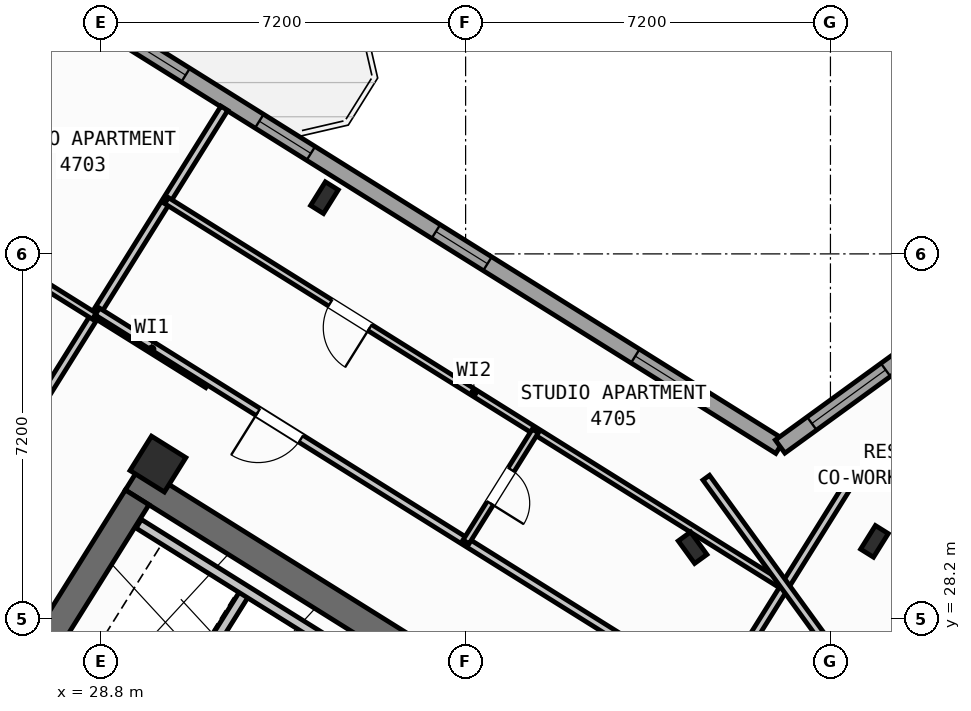
"""IFC4 building model, lengths in metres.
Left out: names, types, materials, properties, quantities, classifications, styles, units other than length and angle.
Written with IfcOpenShell. Run it as: python <this file> out.ifc"""

import sys

from ifc_helpers import new_model, si_unit, direction, frame, frame_2d, origin, origin_2d, place, context, subcontext, project, spatial, rectangle, hollow_rectangle, i_section, extrude, source, transform, mapped, element, fill, save


model = new_model("IFC4")
c1 = context("Model", 3, precision=1e-05, world=origin(), true_north=direction((0.0, 1.0)))
c2 = subcontext(c1, "Body", "Model", "MODEL_VIEW")
j1 = project(units=[si_unit("LENGTHUNIT", "METRE"), si_unit("PLANEANGLEUNIT", "RADIAN")], contexts=[c1])
p1 = place(None, origin())
s1 = spatial("IfcSite", under=j1, at=p1, CompositionType="ELEMENT")
p2 = place(p1, origin())
s2 = spatial("IfcBuilding", under=s1, at=p2, CompositionType="ELEMENT")
p3 = place(p2, frame((0.0, 0.0, 187.8)))
s3 = spatial("IfcBuildingStorey", under=s2, at=p3, CompositionType="ELEMENT", Elevation=187.8)
p4 = place(p3, frame((40.573, 24.01, 0.0), z_axis=(0.0, 0.0, 1.0), x_axis=(-0.848047359947, 0.529920442413, 0.0)))
e1 = element("IfcWall", 1, at=p4, inside=s3, PredefinedType="SHEAR", context=c2, shape_type="SweptSolid", body=[
    extrude(rectangle(XDim=13.14, YDim=0.55, at=frame_2d((6.57, 0.0))), origin(), (0.0, 0.0, 1.0), 3.35),
])
p5 = place(p3, frame((29.517, 30.594, 0.0), z_axis=(0.0, 0.0, 1.0), x_axis=(-0.529906864564, -0.848055844204, 0.0)))
e2 = element("IfcWall", 2, at=p5, inside=s3, PredefinedType="SHEAR", context=c2, shape_type="SweptSolid", body=[
    extrude(rectangle(XDim=3.575, YDim=0.55, at=frame_2d((1.788, 0.0))), origin(), (0.0, 0.0, 1.0), 3.35),
])
p6 = place(p3, frame((44.365, 24.142, 0.0), z_axis=(0.0, 0.0, 1.0), x_axis=(0.809024304885, 0.587775190107, 0.0)))
e3 = element("IfcWall", 3, at=p6, inside=s3, PredefinedType="SHEAR", context=c2, shape_type="SweptSolid", body=[
    extrude(rectangle(XDim=12.34, YDim=0.55, at=frame_2d((6.17, 0.0))), origin(), (0.0, 0.0, 1.0), 3.35),
])
m1 = source(origin(), c2, "Body", "SweptSolid", [
    extrude(i_section(OverallWidth=0.3, OverallDepth=0.55, WebThickness=0.015, FlangeThickness=0.029, at=origin_2d()), origin(), (0.0, 0.0, 1.0), 3.6),
])
for number, where, z_axis, x_axis in (
    (4, (44.068, 29.726, 0.0), (0.0, 0.0, 1.0), (-0.848, 0.53, 0.0)),
    (5, (33.213, 36.509, 0.0), (0.0, 0.0, 1.0), (-0.848, 0.53, 0.0)),
):
    element("IfcColumn", number, at=place(p3, frame(where, z_axis=z_axis, x_axis=x_axis)), inside=s3, PredefinedType="COLUMN", context=c2, shape_type="MappedRepresentation", body=[
        mapped(m1, transform((0.0, 0.0, 0.0), scale=1.0)),
    ])
m2 = source(origin(), c2, "Body", "SweptSolid", [
    extrude(hollow_rectangle(XDim=0.8, YDim=0.8, WallThickness=0.032, at=origin_2d()), origin(), (0.0, 0.0, 1.0), 3.6),
])
p7 = place(p3, frame((29.928, 31.251, 0.0), z_axis=(0.0, 0.0, 1.0), x_axis=(-0.848048096156, 0.529919264233, 0.0)))
e6 = element("IfcColumn", 6, at=p7, inside=s3, PredefinedType="COLUMN", context=c2, shape_type="MappedRepresentation", body=[
    mapped(m2, transform((0.0, 0.0, 0.0), scale=1.0)),
])
p8 = place(p3, frame((40.479, 29.601, 0.0), z_axis=(0.0, 0.0, 1.0), x_axis=(0.809016994375, 0.587785252292, 0.0)))
e7 = element("IfcColumn", 7, at=p8, inside=s3, PredefinedType="COLUMN", context=c2, shape_type="MappedRepresentation", body=[
    mapped(m1, transform((0.0, 0.0, 0.0), scale=1.0)),
])
p9 = place(p3, frame((31.76, 12.183, 0.0), z_axis=(0.0, 0.0, 1.0), x_axis=(-0.848047074256, 0.529920899612, 0.0)))
e8 = element("IfcWall", 8, at=p9, inside=s3, PredefinedType="STANDARD", context=c2, shape_type="SweptSolid", body=[
    extrude(rectangle(XDim=30.652, YDim=0.32, at=frame_2d((15.326, 0.0))), origin(), (0.0, 0.0, 1.0), 3.35),
])
p10 = place(p9, frame((15.166, 0.0, 0.0)))
e9 = element("IfcOpeningElement", 9, at=p10, cuts=e8, PredefinedType="OPENING", context=c2, shape_type="SweptSolid", body=[
    extrude(rectangle(XDim=1.2, YDim=2.15, at=frame_2d((0.6, 1.075))), frame((0.0, 0.17, 0.0), z_axis=(0.0, -1.0, 0.0), x_axis=(1.0, 0.0, 0.0)), (0.0, 0.0, 1.0), 0.34),
])
p11 = place(p9, frame((2.015, 0.0, 0.8)))
e10 = element("IfcOpeningElement", 10, at=p11, cuts=e8, PredefinedType="OPENING", context=c2, shape_type="SweptSolid", body=[
    extrude(rectangle(XDim=2.1, YDim=1.55, at=frame_2d((1.05, 0.775))), frame((0.0, 0.17, 0.0), z_axis=(0.0, -1.0, 0.0), x_axis=(1.0, 0.0, 0.0)), (0.0, 0.0, 1.0), 0.34),
])
p12 = place(p9, frame((7.244, 0.0, 0.8)))
e11 = element("IfcOpeningElement", 11, at=p12, cuts=e8, PredefinedType="OPENING", context=c2, shape_type="SweptSolid", body=[
    extrude(rectangle(XDim=2.1, YDim=1.55, at=frame_2d((1.05, 0.775))), frame((0.0, 0.17, 0.0), z_axis=(0.0, -1.0, 0.0), x_axis=(1.0, 0.0, 0.0)), (0.0, 0.0, 1.0), 0.34),
])
p13 = place(p9, frame((12.623, 0.0, 1.0)))
e12 = element("IfcOpeningElement", 12, at=p13, cuts=e8, PredefinedType="OPENING", context=c2, shape_type="SweptSolid", body=[
    extrude(rectangle(XDim=0.9, YDim=1.25, at=frame_2d((0.45, 0.625))), frame((0.0, 0.17, 0.0), z_axis=(0.0, -1.0, 0.0), x_axis=(1.0, 0.0, 0.0)), (0.0, 0.0, 1.0), 0.34),
])
p14 = place(p9, frame((19.565, 0.0, 0.95)))
e13 = element("IfcOpeningElement", 13, at=p14, cuts=e8, PredefinedType="OPENING", context=c2, shape_type="SweptSolid", body=[
    extrude(rectangle(XDim=1.2, YDim=1.4, at=frame_2d((0.6, 0.7))), frame((0.0, 0.17, 0.0), z_axis=(0.0, -1.0, 0.0), x_axis=(1.0, 0.0, 0.0)), (0.0, 0.0, 1.0), 0.34),
])
p15 = place(p9, frame((25.983, 0.0, 1.0)))
e14 = element("IfcOpeningElement", 14, at=p15, cuts=e8, PredefinedType="OPENING", context=c2, shape_type="SweptSolid", body=[
    extrude(rectangle(XDim=0.9, YDim=1.25, at=frame_2d((0.45, 0.625))), frame((0.0, 0.17, 0.0), z_axis=(0.0, -1.0, 0.0), x_axis=(1.0, 0.0, 0.0)), (0.0, 0.0, 1.0), 0.34),
])
p16 = place(p9, frame((28.433, 0.0, 1.0)))
e15 = element("IfcOpeningElement", 15, at=p16, cuts=e8, PredefinedType="OPENING", context=c2, shape_type="SweptSolid", body=[
    extrude(rectangle(XDim=0.9, YDim=1.25, at=frame_2d((0.45, 0.625))), frame((0.0, 0.17, 0.0), z_axis=(0.0, -1.0, 0.0), x_axis=(1.0, 0.0, 0.0)), (0.0, 0.0, 1.0), 0.34),
])
p17 = place(p3, frame((17.424, 47.083, 0.0), z_axis=(0.0, 0.0, 1.0), x_axis=(0.848049927979, -0.529916332693, 0.0)))
e16 = element("IfcWall", 16, at=p17, inside=s3, PredefinedType="STANDARD", context=c2, shape_type="SweptSolid", body=[
    extrude(rectangle(XDim=29.223, YDim=0.32, at=frame_2d((14.612, 0.0))), origin(), (0.0, 0.0, 1.0), 3.35),
])
p18 = place(p17, frame((3.764, 0.0, 0.0)))
e17 = element("IfcOpeningElement", 17, at=p18, cuts=e16, PredefinedType="OPENING", context=c2, shape_type="SweptSolid", body=[
    extrude(rectangle(XDim=1.05, YDim=2.15, at=frame_2d((0.525, 1.075))), frame((0.0, 0.17, 0.0), z_axis=(0.0, -1.0, 0.0), x_axis=(1.0, 0.0, 0.0)), (0.0, 0.0, 1.0), 0.34),
])
p19 = place(p17, frame((8.344, 0.0, 0.8)))
e18 = element("IfcOpeningElement", 18, at=p19, cuts=e16, PredefinedType="OPENING", context=c2, shape_type="SweptSolid", body=[
    extrude(rectangle(XDim=2.1, YDim=1.55, at=frame_2d((1.05, 0.775))), frame((0.0, 0.17, 0.0), z_axis=(0.0, -1.0, 0.0), x_axis=(1.0, 0.0, 0.0)), (0.0, 0.0, 1.0), 0.34),
])
p20 = place(p17, frame((13.589, 0.0, 0.85)))
e19 = element("IfcOpeningElement", 19, at=p20, cuts=e16, PredefinedType="OPENING", context=c2, shape_type="SweptSolid", body=[
    extrude(rectangle(XDim=1.8, YDim=1.5, at=frame_2d((0.9, 0.75))), frame((0.0, 0.17, 0.0), z_axis=(0.0, -1.0, 0.0), x_axis=(1.0, 0.0, 0.0)), (0.0, 0.0, 1.0), 0.34),
])
p21 = place(p17, frame((17.104, 0.0, 0.95)))
e20 = element("IfcOpeningElement", 20, at=p21, cuts=e16, PredefinedType="OPENING", context=c2, shape_type="SweptSolid", body=[
    extrude(rectangle(XDim=1.2, YDim=1.4, at=frame_2d((0.6, 0.7))), frame((0.0, 0.17, 0.0), z_axis=(0.0, -1.0, 0.0), x_axis=(1.0, 0.0, 0.0)), (0.0, 0.0, 1.0), 0.34),
])
p22 = place(p17, frame((21.214, 0.0, 0.95)))
e21 = element("IfcOpeningElement", 21, at=p22, cuts=e16, PredefinedType="OPENING", context=c2, shape_type="SweptSolid", body=[
    extrude(rectangle(XDim=1.2, YDim=1.4, at=frame_2d((0.6, 0.7))), frame((0.0, 0.17, 0.0), z_axis=(0.0, -1.0, 0.0), x_axis=(1.0, 0.0, 0.0)), (0.0, 0.0, 1.0), 0.34),
])
p23 = place(p17, frame((25.853, 0.0, 0.95)))
e22 = element("IfcOpeningElement", 22, at=p23, cuts=e16, PredefinedType="OPENING", context=c2, shape_type="SweptSolid", body=[
    extrude(rectangle(XDim=1.2, YDim=1.4, at=frame_2d((0.6, 0.7))), frame((0.0, 0.17, 0.0), z_axis=(0.0, -1.0, 0.0), x_axis=(1.0, 0.0, 0.0)), (0.0, 0.0, 1.0), 0.34),
])
p24 = place(p3, frame((42.207, 31.597, 0.0), z_axis=(0.0, 0.0, 1.0), x_axis=(0.809020333377, 0.587780656523, 0.0)))
e23 = element("IfcWall", 23, at=p24, inside=s3, PredefinedType="STANDARD", context=c2, shape_type="SweptSolid", body=[
    extrude(rectangle(XDim=15.223, YDim=0.32, at=frame_2d((7.611, 0.0))), origin(), (0.0, 0.0, 1.0), 3.35),
])
p25 = place(p24, frame((12.82, 0.0, 0.0)))
e24 = element("IfcOpeningElement", 24, at=p25, cuts=e23, PredefinedType="OPENING", context=c2, shape_type="SweptSolid", body=[
    extrude(rectangle(XDim=1.05, YDim=2.15, at=frame_2d((0.525, 1.075))), frame((0.0, 0.17, 0.0), z_axis=(0.0, -1.0, 0.0), x_axis=(1.0, 0.0, 0.0)), (0.0, 0.0, 1.0), 0.34),
])
p26 = place(p24, frame((0.775, 0.0, 0.85)))
e25 = element("IfcOpeningElement", 25, at=p26, cuts=e23, PredefinedType="OPENING", context=c2, shape_type="SweptSolid", body=[
    extrude(rectangle(XDim=1.8, YDim=1.5, at=frame_2d((0.9, 0.75))), frame((0.0, 0.17, 0.0), z_axis=(0.0, -1.0, 0.0), x_axis=(1.0, 0.0, 0.0)), (0.0, 0.0, 1.0), 0.34),
])
p27 = place(p24, frame((5.544, 0.0, 0.85)))
e26 = element("IfcOpeningElement", 26, at=p27, cuts=e23, PredefinedType="OPENING", context=c2, shape_type="SweptSolid", body=[
    extrude(rectangle(XDim=1.8, YDim=1.5, at=frame_2d((0.9, 0.75))), frame((0.0, 0.17, 0.0), z_axis=(0.0, -1.0, 0.0), x_axis=(1.0, 0.0, 0.0)), (0.0, 0.0, 1.0), 0.34),
])
p28 = place(p24, frame((10.219, 0.0, 1.0)))
e27 = element("IfcOpeningElement", 27, at=p28, cuts=e23, PredefinedType="OPENING", context=c2, shape_type="SweptSolid", body=[
    extrude(rectangle(XDim=0.9, YDim=1.25, at=frame_2d((0.45, 0.625))), frame((0.0, 0.17, 0.0), z_axis=(0.0, -1.0, 0.0), x_axis=(1.0, 0.0, 0.0)), (0.0, 0.0, 1.0), 0.34),
])
p29 = place(p3, frame((31.645, 28.716, 0.0), z_axis=(0.0, 0.0, 1.0), x_axis=(-0.52986693015, -0.848080795876, 0.0)))
e28 = element("IfcWall", 28, at=p29, inside=s3, PredefinedType="STANDARD", context=c2, shape_type="SweptSolid", body=[
    extrude(rectangle(XDim=2.66, YDim=0.2, at=frame_2d((1.33, 0.0))), origin(), (0.0, 0.0, 1.0), 3.34),
])
p30 = place(p3, frame((33.363, 27.69, 0.0), z_axis=(0.0, 0.0, 1.0), x_axis=(-0.848047090064, 0.529920874315, 0.0)))
e29 = element("IfcWall", 29, at=p30, inside=s3, PredefinedType="STANDARD", context=c2, shape_type="SweptSolid", body=[
    extrude(rectangle(XDim=4.498, YDim=0.2, at=frame_2d((2.249, 0.0))), origin(), (0.0, 0.0, 1.0), 3.34),
])
p31 = place(p3, frame((30.914, 32.829, 0.0), z_axis=(0.0, 0.0, 1.0), x_axis=(-0.848008813643, 0.529982124211, 0.0)))
e30 = element("IfcWall", 30, at=p31, inside=s3, PredefinedType="PARTITIONING", context=c2, shape_type="SweptSolid", body=[
    extrude(rectangle(XDim=2.61, YDim=0.16, at=frame_2d((1.305, 0.0))), origin(), (0.0, 0.0, 1.0), 3.34),
])
p32 = place(p3, frame((31.239, 38.274, 0.0), z_axis=(0.0, 0.0, 1.0), x_axis=(-0.529914125013, -0.848051307476, 0.0)))
e31 = element("IfcWall", 31, at=p32, inside=s3, PredefinedType="PARTITIONING", context=c2, shape_type="SweptSolid", body=[
    extrude(rectangle(XDim=10.35, YDim=0.16, at=frame_2d((5.175, 0.0))), origin(), (0.0, 0.0, 1.0), 3.34),
])
p33 = place(p3, frame((28.674, 34.169, 0.0), z_axis=(0.0, 0.0, 1.0), x_axis=(-0.848059820872, 0.529900500304, 0.0)))
e32 = element("IfcWall", 32, at=p33, inside=s3, PredefinedType="PLUMBINGWALL", context=c2, shape_type="SweptSolid", body=[
    extrude(rectangle(XDim=3.79, YDim=0.14, at=frame_2d((1.895, 0.0))), origin(), (0.0, 0.0, 1.0), 3.34),
])
p34 = place(p33, frame((2.23, 0.0, 0.0)))
e33 = element("IfcOpeningElement", 33, at=p34, cuts=e32, PredefinedType="OPENING", context=c2, shape_type="SweptSolid", body=[
    extrude(rectangle(XDim=0.92, YDim=2.08, at=frame_2d((0.46, 1.04))), frame((0.0, 0.08, 0.0), z_axis=(0.0, -1.0, 0.0), x_axis=(1.0, 0.0, 0.0)), (0.0, 0.0, 1.0), 0.16),
])
p35 = place(p3, frame((41.936, 26.012, 0.0), z_axis=(0.0, 0.0, 1.0), x_axis=(-0.848051154596, 0.529914369676, 0.0)))
e34 = element("IfcWall", 34, at=p35, inside=s3, PredefinedType="PARTITIONING", context=c2, shape_type="SweptSolid", body=[
    extrude(rectangle(XDim=15.57, YDim=0.16, at=frame_2d((7.785, 0.0))), origin(), (0.0, 0.0, 1.0), 3.34),
])
p36 = place(p35, frame((10.83, 0.0, 0.0)))
e35 = element("IfcOpeningElement", 35, at=p36, cuts=e34, PredefinedType="OPENING", context=c2, shape_type="SweptSolid", body=[
    extrude(rectangle(XDim=1.0, YDim=2.1, at=frame_2d((0.5, 1.05))), frame((0.0, 0.09, 0.0), z_axis=(0.0, -1.0, 0.0), x_axis=(1.0, 0.0, 0.0)), (0.0, 0.0, 1.0), 0.18),
])
p37 = place(p3, frame((43.704, 31.086, 0.0), z_axis=(0.0, 0.0, 1.0), x_axis=(-0.529906828443, -0.848055866774, 0.0)))
e36 = element("IfcWall", 36, at=p37, inside=s3, PredefinedType="PARTITIONING", context=c2, shape_type="SweptSolid", body=[
    extrude(rectangle(XDim=5.48, YDim=0.16, at=frame_2d((2.74, 0.0))), origin(), (0.0, 0.0, 1.0), 3.34),
])
p38 = place(p3, frame((42.226, 28.873, 0.0), z_axis=(0.0, 0.0, 1.0), x_axis=(-0.848049134363, 0.529917602752, 0.0)))
e37 = element("IfcWall", 37, at=p38, inside=s3, PredefinedType="PLUMBINGWALL", context=c2, shape_type="SweptSolid", body=[
    extrude(rectangle(XDim=14.3, YDim=0.14, at=frame_2d((7.15, 0.0))), origin(), (0.0, 0.0, 1.0), 3.34),
])
p39 = place(p38, frame((9.57, 0.0, 0.0)))
e38 = element("IfcOpeningElement", 38, at=p39, cuts=e37, PredefinedType="OPENING", context=c2, shape_type="SweptSolid", body=[
    extrude(rectangle(XDim=0.92, YDim=2.08, at=frame_2d((0.46, 1.04))), frame((0.0, 0.08, 0.0), z_axis=(0.0, -1.0, 0.0), x_axis=(1.0, 0.0, 0.0)), (0.0, 0.0, 1.0), 0.16),
])
p40 = place(p3, frame((37.375, 31.904, 0.0), z_axis=(0.0, 0.0, 1.0), x_axis=(-0.529913878929, -0.848051461244, 0.0)))
e39 = element("IfcWall", 39, at=p40, inside=s3, PredefinedType="PLUMBINGWALL", context=c2, shape_type="SweptSolid", body=[
    extrude(rectangle(XDim=2.58, YDim=0.14, at=frame_2d((1.29, 0.0))), origin(), (0.0, 0.0, 1.0), 3.34),
])
p41 = place(p40, frame((0.9, 0.0, 0.0)))
e40 = element("IfcOpeningElement", 40, at=p41, cuts=e39, PredefinedType="OPENING", context=c2, shape_type="SweptSolid", body=[
    extrude(rectangle(XDim=0.78, YDim=2.05, at=frame_2d((0.39, 1.025))), frame((0.0, 0.08, 0.0), z_axis=(0.0, -1.0, 0.0), x_axis=(1.0, 0.0, 0.0)), (0.0, 0.0, 1.0), 0.16),
])
p42 = place(p3, frame((42.866, 26.044, 0.0), z_axis=(0.0, 0.0, 1.0), x_axis=(0.809020254154, 0.587780765566, 0.0)))
e41 = element("IfcWall", 41, at=p42, inside=s3, PredefinedType="PARTITIONING", context=c2, shape_type="SweptSolid", body=[
    extrude(rectangle(XDim=14.67, YDim=0.16, at=frame_2d((7.335, 0.0))), origin(), (0.0, 0.0, 1.0), 3.34),
])
p43 = place(p42, frame((3.215, 0.0, 0.0)))
e42 = element("IfcOpeningElement", 42, at=p43, cuts=e41, PredefinedType="OPENING", context=c2, shape_type="SweptSolid", body=[
    extrude(rectangle(XDim=1.0, YDim=2.1, at=frame_2d((0.5, 1.05))), frame((0.0, 0.09, 0.0), z_axis=(0.0, -1.0, 0.0), x_axis=(1.0, 0.0, 0.0)), (0.0, 0.0, 1.0), 0.18),
])
p44 = place(p42, frame((9.915, 0.0, 0.0)))
e43 = element("IfcOpeningElement", 43, at=p44, cuts=e41, PredefinedType="OPENING", context=c2, shape_type="SweptSolid", body=[
    extrude(rectangle(XDim=1.0, YDim=2.1, at=frame_2d((0.5, 1.05))), frame((0.0, 0.09, 0.0), z_axis=(0.0, -1.0, 0.0), x_axis=(1.0, 0.0, 0.0)), (0.0, 0.0, 1.0), 0.18),
])
p45 = place(p3, frame((43.969, 26.55, 0.0), z_axis=(0.0, 0.0, 1.0), x_axis=(-0.587776919386, 0.80902304852, 0.0)))
e44 = element("IfcWall", 44, at=p45, inside=s3, PredefinedType="PARTITIONING", context=c2, shape_type="SweptSolid", body=[
    extrude(rectangle(XDim=5.48, YDim=0.16, at=frame_2d((2.74, 0.0))), origin(), (0.0, 0.0, 1.0), 3.34),
])
m3 = source(origin(), c2, "Body", "SweptSolid", [
    extrude(rectangle(XDim=1.8, YDim=1.5, at=frame_2d((0.9, 0.75))), frame((0.0, 0.03, 0.0), z_axis=(0.0, -1.0, 0.0), x_axis=(1.0, 0.0, 0.0)), (0.0, 0.0, 1.0), 0.06),
])
p46 = place(p20, origin())
e45 = element("IfcWindow", 45, at=p46, inside=s3, PartitioningType="SINGLE_PANEL", PredefinedType="WINDOW", context=c2, shape_type="MappedRepresentation", body=[
    mapped(m3, transform((0.0, 0.0, 0.0), scale=1.0)),
])
fill(e19, e45)
m4 = source(origin(), c2, "Body", "SweptSolid", [
    extrude(rectangle(XDim=1.2, YDim=1.4, at=frame_2d((0.6, 0.7))), frame((0.0, 0.03, 0.0), z_axis=(0.0, -1.0, 0.0), x_axis=(1.0, 0.0, 0.0)), (0.0, 0.0, 1.0), 0.06),
])
p47 = place(p21, origin())
e46 = element("IfcWindow", 46, at=p47, inside=s3, PartitioningType="SINGLE_PANEL", PredefinedType="WINDOW", context=c2, shape_type="MappedRepresentation", body=[
    mapped(m4, transform((0.0, 0.0, 0.0), scale=1.0)),
])
fill(e20, e46)
p48 = place(p22, origin())
e47 = element("IfcWindow", 47, at=p48, inside=s3, PartitioningType="SINGLE_PANEL", PredefinedType="WINDOW", context=c2, shape_type="MappedRepresentation", body=[
    mapped(m4, transform((0.0, 0.0, 0.0), scale=1.0)),
])
fill(e21, e47)
p49 = place(p23, origin())
e48 = element("IfcWindow", 48, at=p49, inside=s3, PartitioningType="SINGLE_PANEL", PredefinedType="WINDOW", context=c2, shape_type="MappedRepresentation", body=[
    mapped(m4, transform((0.0, 0.0, 0.0), scale=1.0)),
])
fill(e22, e48)
p50 = place(p26, origin())
e49 = element("IfcWindow", 49, at=p50, inside=s3, PartitioningType="SINGLE_PANEL", PredefinedType="WINDOW", context=c2, shape_type="MappedRepresentation", body=[
    mapped(m3, transform((0.0, 0.0, 0.0), scale=1.0)),
])
fill(e25, e49)
m5 = source(origin(), c2, "Body", "SweptSolid", [
    extrude(rectangle(XDim=1.0, YDim=2.1, at=frame_2d((0.5, 1.05))), frame((0.0, 0.025, 0.0), z_axis=(0.0, -1.0, 0.0), x_axis=(1.0, 0.0, 0.0)), (0.0, 0.0, 1.0), 0.05),
])
p51 = place(p36, origin())
e50 = element("IfcDoor", 50, at=p51, inside=s3, OperationType="SINGLE_SWING_RIGHT", PredefinedType="DOOR", context=c2, shape_type="MappedRepresentation", body=[
    mapped(m5, transform((0.0, 0.0, 0.0), scale=1.0)),
])
fill(e35, e50)
m6 = source(origin(), c2, "Body", "SweptSolid", [
    extrude(rectangle(XDim=0.92, YDim=2.08, at=frame_2d((0.46, 1.04))), frame((0.0, 0.025, 0.0), z_axis=(0.0, -1.0, 0.0), x_axis=(1.0, 0.0, 0.0)), (0.0, 0.0, 1.0), 0.05),
])
p52 = place(p39, origin())
e51 = element("IfcDoor", 51, at=p52, inside=s3, OperationType="SINGLE_SWING_LEFT", PredefinedType="DOOR", context=c2, shape_type="MappedRepresentation", body=[
    mapped(m6, transform((0.0, 0.0, 0.0), scale=1.0)),
])
fill(e38, e51)
m7 = source(origin(), c2, "Body", "SweptSolid", [
    extrude(rectangle(XDim=0.78, YDim=2.05, at=frame_2d((0.39, 1.025))), frame((0.0, 0.025, 0.0), z_axis=(0.0, -1.0, 0.0), x_axis=(1.0, 0.0, 0.0)), (0.0, 0.0, 1.0), 0.05),
])
p53 = place(p41, origin())
e52 = element("IfcDoor", 52, at=p53, inside=s3, OperationType="SINGLE_SWING_RIGHT", PredefinedType="DOOR", context=c2, shape_type="MappedRepresentation", body=[
    mapped(m7, transform((0.0, 0.0, 0.0), scale=1.0)),
])
fill(e40, e52)
save(model, sys.argv[1])
